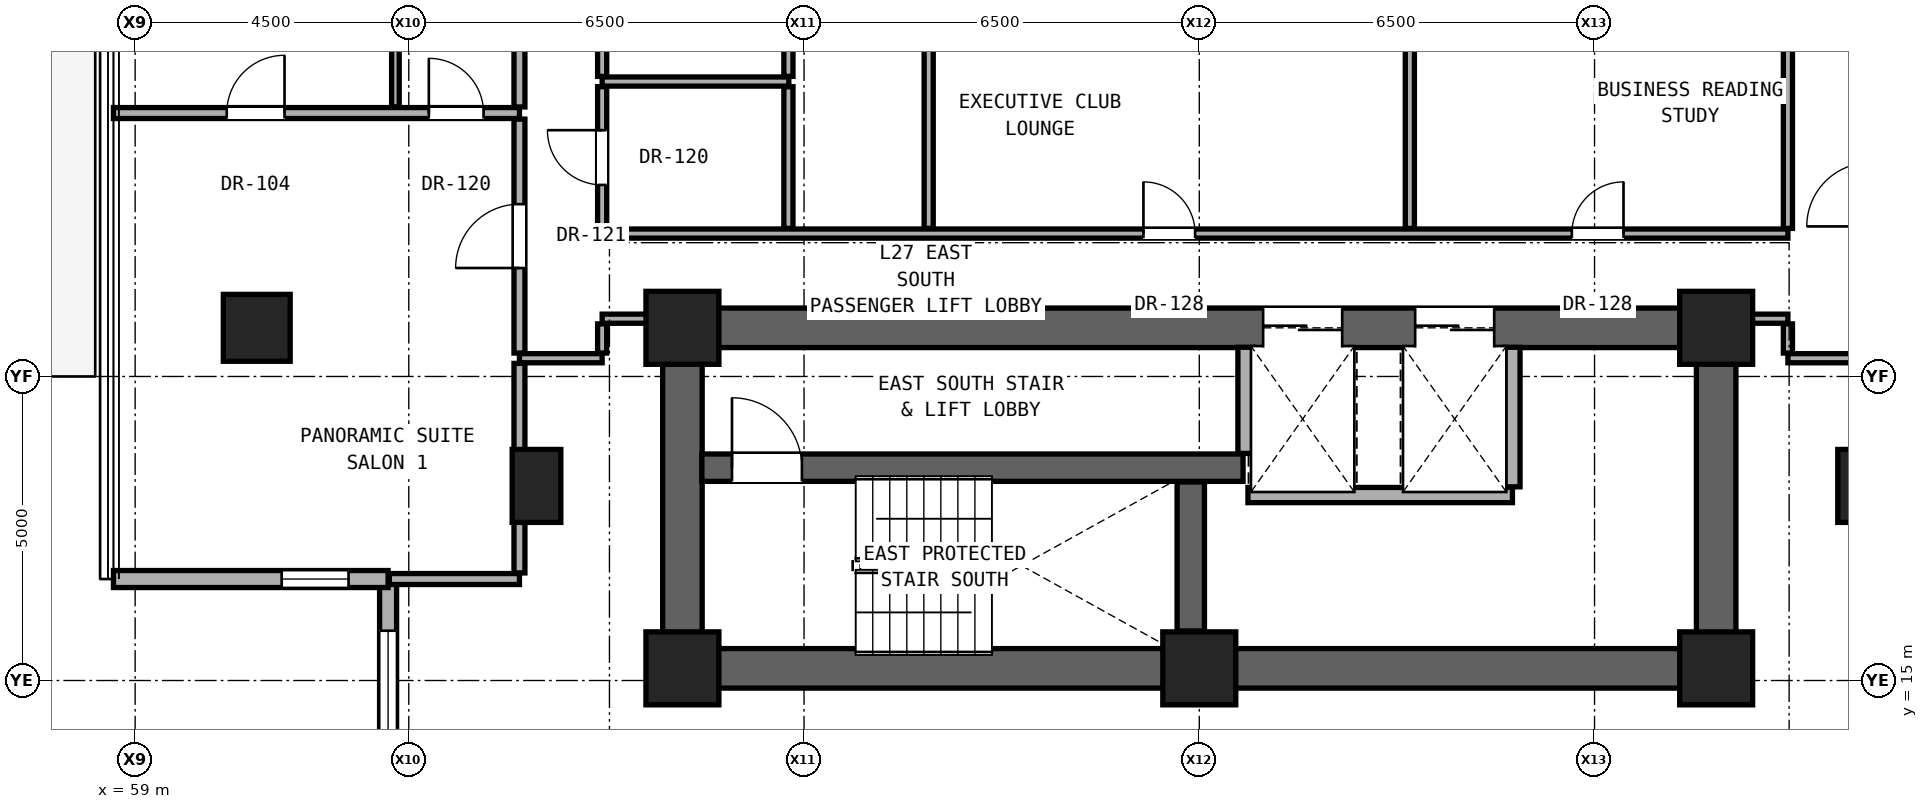
"""IFC4 building model, lengths in metres.
Left out: names, types, materials, properties, quantities, classifications, styles, units other than length and angle.
Written with IfcOpenShell. Run it as: python <this file> out.ifc"""

import sys

from ifc_helpers import new_model, si_unit, direction, frame, frame_2d, origin, origin_2d, place, context, subcontext, project, spatial, rectangle, hollow_rectangle, extrude, element, fill, save


model = new_model("IFC4")
c1 = context("Model", 3, precision=1e-05, world=origin(), true_north=direction((0.0, 1.0)))
c2 = subcontext(c1, "Body", "Model", "MODEL_VIEW")
j1 = project(units=[si_unit("LENGTHUNIT", "METRE"), si_unit("PLANEANGLEUNIT", "RADIAN")], contexts=[c1])
p1 = place(None, origin())
s1 = spatial("IfcSite", under=j1, at=p1, CompositionType="ELEMENT")
p2 = place(p1, origin())
s2 = spatial("IfcBuilding", under=s1, at=p2, CompositionType="ELEMENT")
p3 = place(p2, frame((0.0, 0.0, 98.3)))
s3 = spatial("IfcBuildingStorey", under=s2, at=p3, CompositionType="ELEMENT", Elevation=98.3)
for number, where, z_axis, x_axis in (
    (1, (68.0, 15.2, 0.0), (0.0, 0.0, 1.0), (1.0, 0.0, 0.0)),
    (2, (76.5, 15.2, 0.0), (0.0, 0.0, 1.0), (1.0, 0.0, 0.0)),
    (3, (85.0, 15.2, 0.0), (0.0, 0.0, 1.0), (1.0, 0.0, 0.0)),
    (4, (68.0, 20.8, 0.0), (0.0, 0.0, 1.0), (1.0, 0.0, 0.0)),
    (5, (85.0, 20.8, 0.0), (0.0, 0.0, 1.0), (1.0, 0.0, 0.0)),
):
    element("IfcColumn", number, at=place(p3, frame(where, z_axis=z_axis, x_axis=x_axis)), inside=s3, PredefinedType="COLUMN", context=c2, shape_type="SweptSolid", body=[
        extrude(rectangle(XDim=1.2, YDim=1.2, at=origin_2d()), origin(), (0.0, 0.0, 1.0), 3.3),
    ])
p4 = place(p3, frame((61.0, 20.8, 0.0), z_axis=(0.0, 0.0, 1.0), x_axis=(1.0, 0.0, 0.0)))
e6 = element("IfcColumn", 6, at=p4, inside=s3, PredefinedType="COLUMN", context=c2, shape_type="SweptSolid", body=[
    extrude(hollow_rectangle(XDim=1.1, YDim=1.1, WallThickness=0.06, at=origin_2d()), origin(), (0.0, 0.0, 1.0), 3.3),
])
for number, where, z_axis, x_axis in (
    (7, (65.6, 18.2, 0.0), (0.0, 0.0, 1.0), (1.0, 0.0, 0.0)),
    (8, (87.4, 18.2, 0.0), (0.0, 0.0, 1.0), (1.0, 0.0, 0.0)),
):
    element("IfcColumn", number, at=place(p3, frame(where, z_axis=z_axis, x_axis=x_axis)), inside=s3, PredefinedType="PILASTER", context=c2, shape_type="SweptSolid", body=[
        extrude(rectangle(XDim=0.8, YDim=1.2, at=origin_2d()), origin(), (0.0, 0.0, 1.0), 3.3),
    ])
p5 = place(p3, frame((68.0, 15.2, 0.0), z_axis=(0.0, 0.0, 1.0), x_axis=(1.0, 0.0, 0.0)))
e9 = element("IfcWall", 9, at=p5, inside=s3, PredefinedType="SHEAR", context=c2, shape_type="SweptSolid", body=[
    extrude(rectangle(XDim=17.0, YDim=0.65, at=frame_2d((8.5, 0.0))), origin(), (0.0, 0.0, 1.0), 3.08),
])
for number, where, z_axis, x_axis in (
    (10, (68.0, 15.2, 0.0), (0.0, 0.0, 1.0), (0.0, 1.0, 0.0)),
    (11, (85.0, 15.2, 0.0), (0.0, 0.0, 1.0), (0.0, 1.0, 0.0)),
):
    element("IfcWall", number, at=place(p3, frame(where, z_axis=z_axis, x_axis=x_axis)), inside=s3, PredefinedType="SHEAR", context=c2, shape_type="SweptSolid", body=[
        extrude(rectangle(XDim=5.6, YDim=0.65, at=frame_2d((2.8, 0.0))), origin(), (0.0, 0.0, 1.0), 3.08),
    ])
p6 = place(p3, frame((68.0, 20.8, 0.0), z_axis=(0.0, 0.0, 1.0), x_axis=(1.0, 0.0, 0.0)))
e12 = element("IfcWall", 12, at=p6, inside=s3, PredefinedType="SHEAR", context=c2, shape_type="SweptSolid", body=[
    extrude(rectangle(XDim=17.0, YDim=0.65, at=frame_2d((8.5, 0.0))), origin(), (0.0, 0.0, 1.0), 3.08),
])
p7 = place(p6, frame((9.55, 0.0, 0.0)))
e13 = element("IfcOpeningElement", 13, at=p7, cuts=e12, PredefinedType="OPENING", context=c2, shape_type="SweptSolid", body=[
    extrude(rectangle(XDim=1.3, YDim=2.3, at=frame_2d((0.65, 1.15))), frame((0.0, 0.335, 0.0), z_axis=(0.0, -1.0, 0.0), x_axis=(1.0, 0.0, 0.0)), (0.0, 0.0, 1.0), 0.67),
])
p8 = place(p6, frame((12.05, 0.0, 0.0)))
e14 = element("IfcOpeningElement", 14, at=p8, cuts=e12, PredefinedType="OPENING", context=c2, shape_type="SweptSolid", body=[
    extrude(rectangle(XDim=1.3, YDim=2.3, at=frame_2d((0.65, 1.15))), frame((0.0, 0.335, 0.0), z_axis=(0.0, -1.0, 0.0), x_axis=(1.0, 0.0, 0.0)), (0.0, 0.0, 1.0), 0.67),
])
p9 = place(p3, frame((63.16, 16.669, 0.0), z_axis=(0.0, 0.0, 1.0), x_axis=(0.0, -1.0, 0.0)))
e15 = element("IfcWall", 15, at=p9, inside=s3, PredefinedType="SOLIDWALL", context=c2, shape_type="SweptSolid", body=[
    extrude(rectangle(XDim=4.516, YDim=0.28, at=frame_2d((2.258, 0.0))), origin(), (0.0, 0.0, 1.0), 3.06),
])
p10 = place(p9, frame((0.85, 0.0, 0.81)))
e16 = element("IfcOpeningElement", 16, at=p10, cuts=e15, PredefinedType="OPENING", context=c2, shape_type="SweptSolid", body=[
    extrude(rectangle(XDim=1.8, YDim=2.1, at=frame_2d((0.9, 1.05))), frame((0.0, 0.15, 0.0), z_axis=(0.0, -1.0, 0.0), x_axis=(1.0, 0.0, 0.0)), (0.0, 0.0, 1.0), 0.3),
])
p11 = place(p3, frame((58.644, 16.669, 0.0), z_axis=(0.0, 0.0, 1.0), x_axis=(1.0, 0.0, 0.0)))
e17 = element("IfcWall", 17, at=p11, inside=s3, PredefinedType="SOLIDWALL", context=c2, shape_type="SweptSolid", body=[
    extrude(rectangle(XDim=4.516, YDim=0.28, at=frame_2d((2.258, 0.0))), origin(), (0.0, 0.0, 1.0), 3.06),
])
p12 = place(p11, frame((2.766, 0.0, 0.85)))
e18 = element("IfcOpeningElement", 18, at=p12, cuts=e17, PredefinedType="OPENING", context=c2, shape_type="SweptSolid", body=[
    extrude(rectangle(XDim=1.1, YDim=2.0, at=frame_2d((0.55, 1.0))), frame((0.0, 0.15, 0.0), z_axis=(0.0, -1.0, 0.0), x_axis=(1.0, 0.0, 0.0)), (0.0, 0.0, 1.0), 0.3),
])
p13 = place(p3, frame((63.18, 16.669, 0.0), z_axis=(0.0, 0.0, 1.0), x_axis=(1.0, 0.0, 0.0)))
e19 = element("IfcWall", 19, at=p13, inside=s3, PredefinedType="PARTITIONING", context=c2, shape_type="SweptSolid", body=[
    extrude(rectangle(XDim=2.14, YDim=0.18, at=frame_2d((1.07, 0.0))), origin(), (0.0, 0.0, 1.0), 3.08),
])
p14 = place(p3, frame((77.3, 18.05, 0.0), z_axis=(0.0, 0.0, 1.0), x_axis=(1.0, 0.0, 0.0)))
e20 = element("IfcWall", 20, at=p14, inside=s3, PredefinedType="SOLIDWALL", context=c2, shape_type="SweptSolid", body=[
    extrude(rectangle(XDim=4.35, YDim=0.25, at=frame_2d((2.175, 0.0))), origin(), (0.0, 0.0, 1.0), 3.08),
])
p15 = place(p3, frame((68.32, 18.5, 0.0), z_axis=(0.0, 0.0, 1.0), x_axis=(1.0, 0.0, 0.0)))
e21 = element("IfcWall", 21, at=p15, inside=s3, PredefinedType="SHEAR", context=c2, shape_type="SweptSolid", body=[
    extrude(rectangle(XDim=8.9, YDim=0.45, at=frame_2d((4.45, 0.0))), origin(), (0.0, 0.0, 1.0), 3.08),
])
p16 = place(p15, frame((0.495, 0.0, 0.0)))
e22 = element("IfcOpeningElement", 22, at=p16, cuts=e21, PredefinedType="OPENING", context=c2, shape_type="SweptSolid", body=[
    extrude(rectangle(XDim=1.15, YDim=2.2, at=frame_2d((0.575, 1.1))), frame((0.0, 0.235, 0.0), z_axis=(0.0, -1.0, 0.0), x_axis=(1.0, 0.0, 0.0)), (0.0, 0.0, 1.0), 0.47),
])
p17 = place(p3, frame((65.32, 20.3, 0.0), z_axis=(0.0, 0.0, 1.0), x_axis=(1.0, 0.0, 0.0)))
e23 = element("IfcWall", 23, at=p17, inside=s3, PredefinedType="PARTITIONING", context=c2, shape_type="SweptSolid", body=[
    extrude(rectangle(XDim=1.36, YDim=0.15, at=frame_2d((0.68, 0.0))), origin(), (0.0, 0.0, 1.0), 3.08),
])
p18 = place(p3, frame((86.18, 20.3, 0.0), z_axis=(0.0, 0.0, 1.0), x_axis=(1.0, 0.0, 0.0)))
e24 = element("IfcWall", 24, at=p18, inside=s3, PredefinedType="PARTITIONING", context=c2, shape_type="SweptSolid", body=[
    extrude(rectangle(XDim=1.36, YDim=0.15, at=frame_2d((0.68, 0.0))), origin(), (0.0, 0.0, 1.0), 3.08),
])
p19 = place(p3, frame((66.68, 20.95, 0.0), z_axis=(0.0, 0.0, 1.0), x_axis=(1.0, 0.0, 0.0)))
e25 = element("IfcWall", 25, at=p19, inside=s3, PredefinedType="PARTITIONING", context=c2, shape_type="SweptSolid", body=[
    extrude(rectangle(XDim=1.0, YDim=0.15, at=frame_2d((0.5, 0.0))), origin(), (0.0, 0.0, 1.0), 2.472),
])
p20 = place(p3, frame((85.32, 20.95, 0.0), z_axis=(0.0, 0.0, 1.0), x_axis=(1.0, 0.0, 0.0)))
e26 = element("IfcWall", 26, at=p20, inside=s3, PredefinedType="PARTITIONING", context=c2, shape_type="SweptSolid", body=[
    extrude(rectangle(XDim=0.86, YDim=0.15, at=frame_2d((0.43, 0.0))), origin(), (0.0, 0.0, 1.0), 2.472),
])
p21 = place(p3, frame((66.68, 22.35, 0.0), z_axis=(0.0, 0.0, 1.0), x_axis=(1.0, 0.0, 0.0)))
e27 = element("IfcWall", 27, at=p21, inside=s3, PredefinedType="PARTITIONING", context=c2, shape_type="SweptSolid", body=[
    extrude(rectangle(XDim=19.5, YDim=0.15, at=frame_2d((9.75, 0.0))), origin(), (0.0, 0.0, 1.0), 2.145),
])
p22 = place(p21, frame((8.902, 0.0, 0.0)))
e28 = element("IfcOpeningElement", 28, at=p22, cuts=e27, PredefinedType="OPENING", context=c2, shape_type="SweptSolid", body=[
    extrude(rectangle(XDim=0.85, YDim=2.01, at=frame_2d((0.425, 1.005))), frame((0.0, 0.085, 0.0), z_axis=(0.0, -1.0, 0.0), x_axis=(1.0, 0.0, 0.0)), (0.0, 0.0, 1.0), 0.17),
])
p23 = place(p21, frame((15.947, 0.0, 0.0)))
e29 = element("IfcOpeningElement", 29, at=p23, cuts=e27, PredefinedType="OPENING", context=c2, shape_type="SweptSolid", body=[
    extrude(rectangle(XDim=0.85, YDim=2.01, at=frame_2d((0.425, 1.005))), frame((0.0, 0.085, 0.0), z_axis=(0.0, -1.0, 0.0), x_axis=(1.0, 0.0, 0.0)), (0.0, 0.0, 1.0), 0.17),
])
p24 = place(p3, frame((58.643, 24.332, 0.0), z_axis=(0.0, 0.0, 1.0), x_axis=(1.0, 0.0, 0.0)))
e30 = element("IfcWall", 30, at=p24, inside=s3, PredefinedType="PARTITIONING", context=c2, shape_type="SweptSolid", body=[
    extrude(rectangle(XDim=6.677, YDim=0.18, at=frame_2d((3.338, 0.0))), origin(), (0.0, 0.0, 1.0), 2.216),
])
p25 = place(p24, frame((1.864, 0.0, 0.0)))
e31 = element("IfcOpeningElement", 31, at=p25, cuts=e30, PredefinedType="OPENING", context=c2, shape_type="SweptSolid", body=[
    extrude(rectangle(XDim=0.95, YDim=2.15, at=frame_2d((0.475, 1.075))), frame((0.0, 0.1, 0.0), z_axis=(0.0, -1.0, 0.0), x_axis=(1.0, 0.0, 0.0)), (0.0, 0.0, 1.0), 0.2),
])
p26 = place(p24, frame((5.187, 0.0, 0.0)))
e32 = element("IfcOpeningElement", 32, at=p26, cuts=e30, PredefinedType="OPENING", context=c2, shape_type="SweptSolid", body=[
    extrude(rectangle(XDim=0.9, YDim=2.1, at=frame_2d((0.45, 1.05))), frame((0.0, 0.1, 0.0), z_axis=(0.0, -1.0, 0.0), x_axis=(1.0, 0.0, 0.0)), (0.0, 0.0, 1.0), 0.2),
])
p27 = place(p3, frame((66.68, 24.85, 0.0), z_axis=(0.0, 0.0, 1.0), x_axis=(1.0, 0.0, 0.0)))
e33 = element("IfcWall", 33, at=p27, inside=s3, PredefinedType="PARTITIONING", context=c2, shape_type="SweptSolid", body=[
    extrude(rectangle(XDim=3.07, YDim=0.15, at=frame_2d((1.535, 0.0))), origin(), (0.0, 0.0, 1.0), 2.145),
])
p28 = place(p3, frame((63.28, 24.432, 0.0), z_axis=(0.0, 0.0, 1.0), x_axis=(0.0, 1.0, 0.0)))
e34 = element("IfcWall", 34, at=p28, inside=s3, PredefinedType="PARTITIONING", context=c2, shape_type="SweptSolid", body=[
    extrude(rectangle(XDim=2.128, YDim=0.125, at=frame_2d((1.064, 0.0))), origin(), (0.0, 0.0, 1.0), 3.08),
])
p29 = place(p3, frame((65.32, 16.769, 0.0), z_axis=(0.0, 0.0, 1.0), x_axis=(0.0, 1.0, 0.0)))
e35 = element("IfcWall", 35, at=p29, inside=s3, PredefinedType="PARTITIONING", context=c2, shape_type="SweptSolid", body=[
    extrude(rectangle(XDim=3.446, YDim=0.18, at=frame_2d((1.723, 0.0))), origin(), (0.0, 0.0, 1.0), 2.456),
])
p30 = place(p3, frame((65.32, 20.385, 0.0), z_axis=(0.0, 0.0, 1.0), x_axis=(0.0, 1.0, 0.0)))
e36 = element("IfcWall", 36, at=p30, inside=s3, PredefinedType="PARTITIONING", context=c2, shape_type="SweptSolid", body=[
    extrude(rectangle(XDim=3.847, YDim=0.18, at=frame_2d((1.923, 0.0))), origin(), (0.0, 0.0, 1.0), 2.472),
])
p31 = place(p30, frame((1.398, 0.0, 0.0)))
e37 = element("IfcOpeningElement", 37, at=p31, cuts=e36, PredefinedType="OPENING", context=c2, shape_type="SweptSolid", body=[
    extrude(rectangle(XDim=1.05, YDim=2.2, at=frame_2d((0.525, 1.1))), frame((0.0, 0.1, 0.0), z_axis=(0.0, -1.0, 0.0), x_axis=(1.0, 0.0, 0.0)), (0.0, 0.0, 1.0), 0.2),
])
p32 = place(p3, frame((65.32, 24.432, 0.0), z_axis=(0.0, 0.0, 1.0), x_axis=(0.0, 1.0, 0.0)))
e38 = element("IfcWall", 38, at=p32, inside=s3, PredefinedType="PARTITIONING", context=c2, shape_type="SweptSolid", body=[
    extrude(rectangle(XDim=2.128, YDim=0.18, at=frame_2d((1.064, 0.0))), origin(), (0.0, 0.0, 1.0), 3.08),
])
p33 = place(p3, frame((66.68, 20.385, 0.0), z_axis=(0.0, 0.0, 1.0), x_axis=(0.0, 1.0, 0.0)))
e39 = element("IfcWall", 39, at=p33, inside=s3, PredefinedType="PARTITIONING", context=c2, shape_type="SweptSolid", body=[
    extrude(rectangle(XDim=0.48, YDim=0.15, at=frame_2d((0.24, 0.0))), origin(), (0.0, 0.0, 1.0), 2.472),
])
p34 = place(p3, frame((66.68, 22.435, 0.0), z_axis=(0.0, 0.0, 1.0), x_axis=(0.0, 1.0, 0.0)))
e40 = element("IfcWall", 40, at=p34, inside=s3, PredefinedType="PARTITIONING", context=c2, shape_type="SweptSolid", body=[
    extrude(rectangle(XDim=2.33, YDim=0.15, at=frame_2d((1.165, 0.0))), origin(), (0.0, 0.0, 1.0), 3.08),
])
p35 = place(p34, frame((0.715, 0.0, 0.0)))
e41 = element("IfcOpeningElement", 41, at=p35, cuts=e40, PredefinedType="OPENING", context=c2, shape_type="SweptSolid", body=[
    extrude(rectangle(XDim=0.9, YDim=2.1, at=frame_2d((0.45, 1.05))), frame((0.0, 0.085, 0.0), z_axis=(0.0, -1.0, 0.0), x_axis=(1.0, 0.0, 0.0)), (0.0, 0.0, 1.0), 0.17),
])
p36 = place(p3, frame((66.68, 24.935, 0.0), z_axis=(0.0, 0.0, 1.0), x_axis=(0.0, 1.0, 0.0)))
e42 = element("IfcWall", 42, at=p36, inside=s3, PredefinedType="PARTITIONING", context=c2, shape_type="SweptSolid", body=[
    extrude(rectangle(XDim=5.63, YDim=0.15, at=frame_2d((2.815, 0.0))), origin(), (0.0, 0.0, 1.0), 2.299),
])
p37 = place(p36, frame((2.34, 0.0, 0.0)))
e43 = element("IfcOpeningElement", 43, at=p37, cuts=e42, PredefinedType="OPENING", context=c2, shape_type="SweptSolid", body=[
    extrude(rectangle(XDim=0.95, YDim=2.15, at=frame_2d((0.475, 1.075))), frame((0.0, 0.085, 0.0), z_axis=(0.0, -1.0, 0.0), x_axis=(1.0, 0.0, 0.0)), (0.0, 0.0, 1.0), 0.17),
])
p38 = place(p3, frame((69.743, 22.435, 0.0), z_axis=(0.0, 0.0, 1.0), x_axis=(0.0, 1.0, 0.0)))
e44 = element("IfcWall", 44, at=p38, inside=s3, PredefinedType="PARTITIONING", context=c2, shape_type="SweptSolid", body=[
    extrude(rectangle(XDim=2.33, YDim=0.15, at=frame_2d((1.165, 0.0))), origin(), (0.0, 0.0, 1.0), 3.08),
])
p39 = place(p3, frame((69.743, 24.935, 0.0), z_axis=(0.0, 0.0, 1.0), x_axis=(0.0, 1.0, 0.0)))
e45 = element("IfcWall", 45, at=p39, inside=s3, PredefinedType="PARTITIONING", context=c2, shape_type="SweptSolid", body=[
    extrude(rectangle(XDim=5.63, YDim=0.15, at=frame_2d((2.815, 0.0))), origin(), (0.0, 0.0, 1.0), 2.145),
])
p40 = place(p3, frame((72.05, 22.435, 0.0), z_axis=(0.0, 0.0, 1.0), x_axis=(0.0, 1.0, 0.0)))
e46 = element("IfcWall", 46, at=p40, inside=s3, PredefinedType="PARTITIONING", context=c2, shape_type="SweptSolid", body=[
    extrude(rectangle(XDim=3.565, YDim=0.15, at=frame_2d((1.782, 0.0))), origin(), (0.0, 0.0, 1.0), 2.609),
])
p41 = place(p3, frame((76.36, 15.815, 0.0), z_axis=(0.0, 0.0, 1.0), x_axis=(0.0, 1.0, 0.0)))
e47 = element("IfcWall", 47, at=p41, inside=s3, PredefinedType="SHEAR", context=c2, shape_type="SweptSolid", body=[
    extrude(rectangle(XDim=2.45, YDim=0.45, at=frame_2d((1.225, 0.0))), origin(), (0.0, 0.0, 1.0), 3.08),
])
p42 = place(p3, frame((77.26, 18.735, 0.0), z_axis=(0.0, 0.0, 1.0), x_axis=(0.0, 1.0, 0.0)))
e48 = element("IfcWall", 48, at=p42, inside=s3, PredefinedType="SOLIDWALL", context=c2, shape_type="SweptSolid", body=[
    extrude(rectangle(XDim=1.745, YDim=0.25, at=frame_2d((0.873, 0.0))), origin(), (0.0, 0.0, 1.0), 3.08),
])
p43 = place(p3, frame((79.963, 22.435, 0.0), z_axis=(0.0, 0.0, 1.0), x_axis=(0.0, 1.0, 0.0)))
e49 = element("IfcWall", 49, at=p43, inside=s3, PredefinedType="PARTITIONING", context=c2, shape_type="SweptSolid", body=[
    extrude(rectangle(XDim=3.565, YDim=0.15, at=frame_2d((1.782, 0.0))), origin(), (0.0, 0.0, 1.0), 3.08),
])
p44 = place(p3, frame((81.65, 18.185, 0.0), z_axis=(0.0, 0.0, 1.0), x_axis=(0.0, 1.0, 0.0)))
e50 = element("IfcWall", 50, at=p44, inside=s3, PredefinedType="SOLIDWALL", context=c2, shape_type="SweptSolid", body=[
    extrude(rectangle(XDim=2.295, YDim=0.25, at=frame_2d((1.147, 0.0))), origin(), (0.0, 0.0, 1.0), 3.08),
])
p45 = place(p3, frame((86.18, 20.385, 0.0), z_axis=(0.0, 0.0, 1.0), x_axis=(0.0, 1.0, 0.0)))
e51 = element("IfcWall", 51, at=p45, inside=s3, PredefinedType="PARTITIONING", context=c2, shape_type="SweptSolid", body=[
    extrude(rectangle(XDim=0.48, YDim=0.15, at=frame_2d((0.24, 0.0))), origin(), (0.0, 0.0, 1.0), 2.472),
])
p46 = place(p3, frame((86.18, 22.435, 0.0), z_axis=(0.0, 0.0, 1.0), x_axis=(0.0, 1.0, 0.0)))
e52 = element("IfcWall", 52, at=p46, inside=s3, PredefinedType="PARTITIONING", context=c2, shape_type="SweptSolid", body=[
    extrude(rectangle(XDim=3.565, YDim=0.15, at=frame_2d((1.782, 0.0))), origin(), (0.0, 0.0, 1.0), 3.08),
])
p47 = place(p10, origin())
e53 = element("IfcWindow", 53, at=p47, inside=s3, PartitioningType="SINGLE_PANEL", PredefinedType="WINDOW", context=c2, shape_type="SweptSolid", body=[
    extrude(rectangle(XDim=1.8, YDim=2.1, at=frame_2d((0.9, 1.05))), frame((0.0, 0.03, 0.0), z_axis=(0.0, -1.0, 0.0), x_axis=(1.0, 0.0, 0.0)), (0.0, 0.0, 1.0), 0.06),
])
fill(e16, e53)
p48 = place(p12, origin())
e54 = element("IfcWindow", 54, at=p48, inside=s3, PartitioningType="SINGLE_PANEL", PredefinedType="WINDOW", context=c2, shape_type="SweptSolid", body=[
    extrude(rectangle(XDim=1.1, YDim=2.0, at=frame_2d((0.55, 1.0))), frame((0.0, 0.03, 0.0), z_axis=(0.0, -1.0, 0.0), x_axis=(1.0, 0.0, 0.0)), (0.0, 0.0, 1.0), 0.06),
])
fill(e18, e54)
p49 = place(p16, origin())
e55 = element("IfcDoor", 55, at=p49, inside=s3, OperationType="SINGLE_SWING_LEFT", PredefinedType="DOOR", context=c2, shape_type="SweptSolid", body=[
    extrude(rectangle(XDim=1.15, YDim=2.2, at=frame_2d((0.575, 1.1))), frame((0.0, 0.025, 0.0), z_axis=(0.0, -1.0, 0.0), x_axis=(1.0, 0.0, 0.0)), (0.0, 0.0, 1.0), 0.05),
])
fill(e22, e55)
p50 = place(p35, origin())
e56 = element("IfcDoor", 56, at=p50, inside=s3, OperationType="SINGLE_SWING_RIGHT", PredefinedType="DOOR", context=c2, shape_type="SweptSolid", body=[
    extrude(rectangle(XDim=0.9, YDim=2.1, at=frame_2d((0.45, 1.05))), frame((0.0, 0.025, 0.0), z_axis=(0.0, -1.0, 0.0), x_axis=(1.0, 0.0, 0.0)), (0.0, 0.0, 1.0), 0.05),
])
fill(e41, e56)
p51 = place(p31, origin())
e57 = element("IfcDoor", 57, at=p51, inside=s3, OperationType="SINGLE_SWING_LEFT", PredefinedType="DOOR", context=c2, shape_type="SweptSolid", body=[
    extrude(rectangle(XDim=1.05, YDim=2.2, at=frame_2d((0.525, 1.1))), frame((0.0, 0.025, 0.0), z_axis=(0.0, -1.0, 0.0), x_axis=(1.0, 0.0, 0.0)), (0.0, 0.0, 1.0), 0.05),
])
fill(e37, e57)
p52 = place(p25, origin())
e58 = element("IfcDoor", 58, at=p52, inside=s3, OperationType="SINGLE_SWING_RIGHT", PredefinedType="DOOR", context=c2, shape_type="SweptSolid", body=[
    extrude(rectangle(XDim=0.95, YDim=2.15, at=frame_2d((0.475, 1.075))), frame((0.0, 0.025, 0.0), z_axis=(0.0, -1.0, 0.0), x_axis=(1.0, 0.0, 0.0)), (0.0, 0.0, 1.0), 0.05),
])
fill(e31, e58)
p53 = place(p26, origin())
e59 = element("IfcDoor", 59, at=p53, inside=s3, OperationType="SINGLE_SWING_LEFT", PredefinedType="DOOR", context=c2, shape_type="SweptSolid", body=[
    extrude(rectangle(XDim=0.9, YDim=2.1, at=frame_2d((0.45, 1.05))), frame((0.0, 0.025, 0.0), z_axis=(0.0, -1.0, 0.0), x_axis=(1.0, 0.0, 0.0)), (0.0, 0.0, 1.0), 0.05),
])
fill(e32, e59)
p54 = place(p22, origin())
e60 = element("IfcDoor", 60, at=p54, inside=s3, OperationType="SINGLE_SWING_LEFT", PredefinedType="DOOR", context=c2, shape_type="SweptSolid", body=[
    extrude(rectangle(XDim=0.85, YDim=2.01, at=frame_2d((0.425, 1.005))), frame((0.0, 0.025, 0.0), z_axis=(0.0, -1.0, 0.0), x_axis=(1.0, 0.0, 0.0)), (0.0, 0.0, 1.0), 0.05),
])
fill(e28, e60)
p55 = place(p23, origin())
e61 = element("IfcDoor", 61, at=p55, inside=s3, OperationType="SINGLE_SWING_RIGHT", PredefinedType="DOOR", context=c2, shape_type="SweptSolid", body=[
    extrude(rectangle(XDim=0.85, YDim=2.01, at=frame_2d((0.425, 1.005))), frame((0.0, 0.025, 0.0), z_axis=(0.0, -1.0, 0.0), x_axis=(1.0, 0.0, 0.0)), (0.0, 0.0, 1.0), 0.05),
])
fill(e29, e61)
p56 = place(p7, origin())
e62 = element("IfcDoor", 62, at=p56, inside=s3, OperationType="DOUBLE_DOOR_SLIDING", PredefinedType="DOOR", context=c2, shape_type="SweptSolid", body=[
    extrude(rectangle(XDim=1.3, YDim=2.3, at=frame_2d((0.65, 1.15))), frame((0.0, 0.025, 0.0), z_axis=(0.0, -1.0, 0.0), x_axis=(1.0, 0.0, 0.0)), (0.0, 0.0, 1.0), 0.05),
])
fill(e13, e62)
p57 = place(p8, origin())
e63 = element("IfcDoor", 63, at=p57, inside=s3, OperationType="DOUBLE_DOOR_SLIDING", PredefinedType="DOOR", context=c2, shape_type="SweptSolid", body=[
    extrude(rectangle(XDim=1.3, YDim=2.3, at=frame_2d((0.65, 1.15))), frame((0.0, 0.025, 0.0), z_axis=(0.0, -1.0, 0.0), x_axis=(1.0, 0.0, 0.0)), (0.0, 0.0, 1.0), 0.05),
])
fill(e14, e63)
save(model, sys.argv[1])
